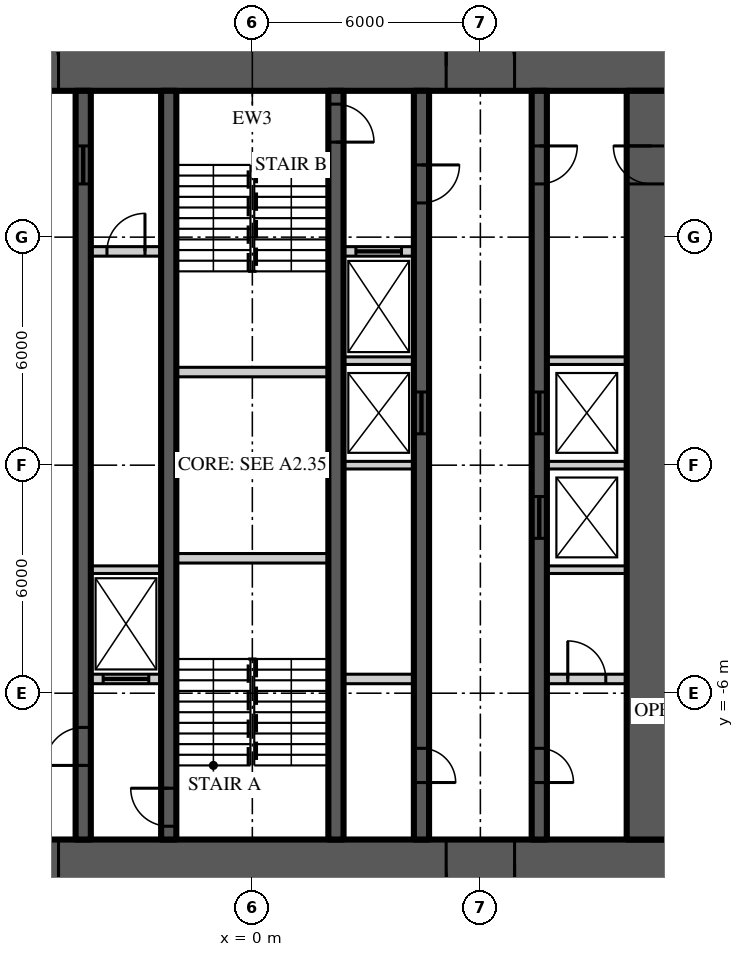
"""IFC4 building model, lengths in metres.
Left out: names, types, materials, properties, quantities, classifications, styles, units other than length and angle.
Written with IfcOpenShell. Run it as: python <this file> out.ifc"""

import sys

from ifc_helpers import new_model, si_unit, direction, frame, frame_2d, origin, place, context, subcontext, project, spatial, rectangle, extrude, element, fill, save


model = new_model("IFC4")
c1 = context("Model", 3, precision=1e-05, world=origin(), true_north=direction((0.0, 1.0)))
c2 = subcontext(c1, "Body", "Model", "MODEL_VIEW")
j1 = project(units=[si_unit("LENGTHUNIT", "METRE"), si_unit("PLANEANGLEUNIT", "RADIAN")], contexts=[c1])
p1 = place(None, origin())
s1 = spatial("IfcSite", under=j1, at=p1, CompositionType="ELEMENT")
p2 = place(p1, origin())
s2 = spatial("IfcBuilding", under=s1, at=p2, CompositionType="ELEMENT")
p3 = place(p2, frame((0.0, 0.0, 267.3)))
s3 = spatial("IfcBuildingStorey", under=s2, at=p3, CompositionType="ELEMENT", Elevation=267.3)
p4 = place(p3, frame((-11.15, 10.5, 0.0), z_axis=(0.0, 0.0, 1.0), x_axis=(1.0, 0.0, 0.0)))
e1 = element("IfcWall", 1, at=p4, inside=s3, PredefinedType="SHEAR", context=c2, shape_type="SweptSolid", body=[
    extrude(rectangle(XDim=22.3, YDim=1.3, at=frame_2d((11.15, 0.0))), origin(), (0.0, 0.0, 1.0), 3.9),
])
p5 = place(p4, frame((4.25, 0.0, 0.0)))
e2 = element("IfcOpeningElement", 2, at=p5, cuts=e1, PredefinedType="OPENING", context=c2, shape_type="SweptSolid", body=[
    extrude(rectangle(XDim=1.8, YDim=2.2, at=frame_2d((0.9, 1.1))), frame((0.0, 0.66, 0.0), z_axis=(0.0, -1.0, 0.0), x_axis=(1.0, 0.0, 0.0)), (0.0, 0.0, 1.0), 1.32),
])
p6 = place(p4, frame((16.25, 0.0, 0.0)))
e3 = element("IfcOpeningElement", 3, at=p6, cuts=e1, PredefinedType="OPENING", context=c2, shape_type="SweptSolid", body=[
    extrude(rectangle(XDim=1.8, YDim=2.2, at=frame_2d((0.9, 1.1))), frame((0.0, 0.66, 0.0), z_axis=(0.0, -1.0, 0.0), x_axis=(1.0, 0.0, 0.0)), (0.0, 0.0, 1.0), 1.32),
])
p7 = place(p3, frame((11.15, -10.5, 0.0), z_axis=(0.0, 0.0, 1.0), x_axis=(-1.0, 0.0, 0.0)))
e4 = element("IfcWall", 4, at=p7, inside=s3, PredefinedType="SHEAR", context=c2, shape_type="SweptSolid", body=[
    extrude(rectangle(XDim=22.3, YDim=1.3, at=frame_2d((11.15, 0.0))), origin(), (0.0, 0.0, 1.0), 3.9),
])
p8 = place(p7, frame((16.25, 0.0, 0.0)))
e5 = element("IfcOpeningElement", 5, at=p8, cuts=e4, PredefinedType="OPENING", context=c2, shape_type="SweptSolid", body=[
    extrude(rectangle(XDim=1.8, YDim=2.2, at=frame_2d((0.9, 1.1))), frame((0.0, 0.66, 0.0), z_axis=(0.0, -1.0, 0.0), x_axis=(1.0, 0.0, 0.0)), (0.0, 0.0, 1.0), 1.32),
])
p9 = place(p7, frame((4.25, 0.0, 0.0)))
e6 = element("IfcOpeningElement", 6, at=p9, cuts=e4, PredefinedType="OPENING", context=c2, shape_type="SweptSolid", body=[
    extrude(rectangle(XDim=1.8, YDim=2.2, at=frame_2d((0.9, 1.1))), frame((0.0, 0.66, 0.0), z_axis=(0.0, -1.0, 0.0), x_axis=(1.0, 0.0, 0.0)), (0.0, 0.0, 1.0), 1.32),
])
p10 = place(p3, frame((10.5, -9.85, 0.0), z_axis=(0.0, 0.0, 1.0), x_axis=(0.0, 1.0, 0.0)))
e7 = element("IfcWall", 7, at=p10, inside=s3, PredefinedType="SHEAR", context=c2, shape_type="SweptSolid", body=[
    extrude(rectangle(XDim=19.7, YDim=1.3, at=frame_2d((9.85, 0.0))), origin(), (0.0, 0.0, 1.0), 3.9),
])
p11 = place(p10, frame((17.25, 0.0, 0.0)))
e8 = element("IfcOpeningElement", 8, at=p11, cuts=e7, PredefinedType="OPENING", context=c2, shape_type="SweptSolid", body=[
    extrude(rectangle(XDim=1.0, YDim=2.2, at=frame_2d((0.5, 1.1))), frame((0.0, 0.66, 0.0), z_axis=(0.0, -1.0, 0.0), x_axis=(1.0, 0.0, 0.0)), (0.0, 0.0, 1.0), 1.32),
])
p12 = place(p3, frame((7.55, 9.85, 0.0), z_axis=(0.0, 0.0, 1.0), x_axis=(0.0, -1.0, 0.0)))
e9 = element("IfcWall", 9, at=p12, inside=s3, PredefinedType="SHEAR", context=c2, shape_type="SweptSolid", body=[
    extrude(rectangle(XDim=19.7, YDim=0.4, at=frame_2d((9.85, 0.0))), origin(), (0.0, 0.0, 1.0), 3.9),
])
p13 = place(p12, frame((1.45, 0.0, 0.0)))
e10 = element("IfcOpeningElement", 10, at=p13, cuts=e9, PredefinedType="OPENING", context=c2, shape_type="SweptSolid", body=[
    extrude(rectangle(XDim=1.0, YDim=2.2, at=frame_2d((0.5, 1.1))), frame((0.0, 0.21, 0.0), z_axis=(0.0, -1.0, 0.0), x_axis=(1.0, 0.0, 0.0)), (0.0, 0.0, 1.0), 0.42),
])
p14 = place(p12, frame((17.3, 0.0, 0.0)))
e11 = element("IfcOpeningElement", 11, at=p14, cuts=e9, PredefinedType="OPENING", context=c2, shape_type="SweptSolid", body=[
    extrude(rectangle(XDim=0.9, YDim=2.1, at=frame_2d((0.45, 1.05))), frame((0.0, 0.21, 0.0), z_axis=(0.0, -1.0, 0.0), x_axis=(1.0, 0.0, 0.0)), (0.0, 0.0, 1.0), 0.42),
])
p15 = place(p12, frame((7.925, 0.0, 0.0)))
e12 = element("IfcOpeningElement", 12, at=p15, cuts=e9, PredefinedType="OPENING", context=c2, shape_type="SweptSolid", body=[
    extrude(rectangle(XDim=1.1, YDim=2.2, at=frame_2d((0.55, 1.1))), frame((0.0, 0.21, 0.0), z_axis=(0.0, -1.0, 0.0), x_axis=(1.0, 0.0, 0.0)), (0.0, 0.0, 1.0), 0.42),
])
p16 = place(p12, frame((10.675, 0.0, 0.0)))
e13 = element("IfcOpeningElement", 13, at=p16, cuts=e9, PredefinedType="OPENING", context=c2, shape_type="SweptSolid", body=[
    extrude(rectangle(XDim=1.1, YDim=2.2, at=frame_2d((0.55, 1.1))), frame((0.0, 0.21, 0.0), z_axis=(0.0, -1.0, 0.0), x_axis=(1.0, 0.0, 0.0)), (0.0, 0.0, 1.0), 0.42),
])
p17 = place(p3, frame((-4.45, -9.85, 0.0), z_axis=(0.0, 0.0, 1.0), x_axis=(0.0, 1.0, 0.0)))
e14 = element("IfcWall", 14, at=p17, inside=s3, PredefinedType="SHEAR", context=c2, shape_type="SweptSolid", body=[
    extrude(rectangle(XDim=19.7, YDim=0.4, at=frame_2d((9.85, 0.0))), origin(), (0.0, 0.0, 1.0), 3.9),
])
p18 = place(p17, frame((1.95, 0.0, 0.0)))
e15 = element("IfcOpeningElement", 15, at=p18, cuts=e14, PredefinedType="OPENING", context=c2, shape_type="SweptSolid", body=[
    extrude(rectangle(XDim=1.0, YDim=2.2, at=frame_2d((0.5, 1.1))), frame((0.0, 0.21, 0.0), z_axis=(0.0, -1.0, 0.0), x_axis=(1.0, 0.0, 0.0)), (0.0, 0.0, 1.0), 0.42),
])
p19 = place(p17, frame((17.25, 0.0, 0.0)))
e16 = element("IfcOpeningElement", 16, at=p19, cuts=e14, PredefinedType="OPENING", context=c2, shape_type="SweptSolid", body=[
    extrude(rectangle(XDim=1.0, YDim=2.1, at=frame_2d((0.5, 1.05))), frame((0.0, 0.21, 0.0), z_axis=(0.0, -1.0, 0.0), x_axis=(1.0, 0.0, 0.0)), (0.0, 0.0, 1.0), 0.42),
])
p20 = place(p3, frame((4.45, 9.85, 0.0), z_axis=(0.0, 0.0, 1.0), x_axis=(0.0, -1.0, 0.0)))
e17 = element("IfcWall", 17, at=p20, inside=s3, PredefinedType="SHEAR", context=c2, shape_type="SweptSolid", body=[
    extrude(rectangle(XDim=19.7, YDim=0.4, at=frame_2d((9.85, 0.0))), origin(), (0.0, 0.0, 1.0), 3.9),
])
p21 = place(p20, frame((1.95, 0.0, 0.0)))
e18 = element("IfcOpeningElement", 18, at=p21, cuts=e17, PredefinedType="OPENING", context=c2, shape_type="SweptSolid", body=[
    extrude(rectangle(XDim=1.0, YDim=2.2, at=frame_2d((0.5, 1.1))), frame((0.0, 0.21, 0.0), z_axis=(0.0, -1.0, 0.0), x_axis=(1.0, 0.0, 0.0)), (0.0, 0.0, 1.0), 0.42),
])
p22 = place(p20, frame((17.3, 0.0, 0.0)))
e19 = element("IfcOpeningElement", 19, at=p22, cuts=e17, PredefinedType="OPENING", context=c2, shape_type="SweptSolid", body=[
    extrude(rectangle(XDim=0.9, YDim=2.1, at=frame_2d((0.45, 1.05))), frame((0.0, 0.21, 0.0), z_axis=(0.0, -1.0, 0.0), x_axis=(1.0, 0.0, 0.0)), (0.0, 0.0, 1.0), 0.42),
])
p23 = place(p20, frame((7.925, 0.0, 0.0)))
e20 = element("IfcOpeningElement", 20, at=p23, cuts=e17, PredefinedType="OPENING", context=c2, shape_type="SweptSolid", body=[
    extrude(rectangle(XDim=1.1, YDim=2.2, at=frame_2d((0.55, 1.1))), frame((0.0, 0.21, 0.0), z_axis=(0.0, -1.0, 0.0), x_axis=(1.0, 0.0, 0.0)), (0.0, 0.0, 1.0), 0.42),
])
p24 = place(p3, frame((-2.2, -9.85, 0.0), z_axis=(0.0, 0.0, 1.0), x_axis=(0.0, 1.0, 0.0)))
e21 = element("IfcWall", 21, at=p24, inside=s3, PredefinedType="SHEAR", context=c2, shape_type="SweptSolid", body=[
    extrude(rectangle(XDim=19.7, YDim=0.4, at=frame_2d((9.85, 0.0))), origin(), (0.0, 0.0, 1.0), 3.9),
])
p25 = place(p24, frame((0.35, 0.0, 0.0)))
e22 = element("IfcOpeningElement", 22, at=p25, cuts=e21, PredefinedType="OPENING", context=c2, shape_type="SweptSolid", body=[
    extrude(rectangle(XDim=1.0, YDim=2.2, at=frame_2d((0.5, 1.1))), frame((0.0, 0.21, 0.0), z_axis=(0.0, -1.0, 0.0), x_axis=(1.0, 0.0, 0.0)), (0.0, 0.0, 1.0), 0.42),
])
p26 = place(p3, frame((2.2, 9.85, 0.0), z_axis=(0.0, 0.0, 1.0), x_axis=(0.0, -1.0, 0.0)))
e23 = element("IfcWall", 23, at=p26, inside=s3, PredefinedType="SHEAR", context=c2, shape_type="SweptSolid", body=[
    extrude(rectangle(XDim=19.7, YDim=0.4, at=frame_2d((9.85, 0.0))), origin(), (0.0, 0.0, 1.0), 3.9),
])
p27 = place(p26, frame((0.35, 0.0, 0.0)))
e24 = element("IfcOpeningElement", 24, at=p27, cuts=e23, PredefinedType="OPENING", context=c2, shape_type="SweptSolid", body=[
    extrude(rectangle(XDim=1.0, YDim=2.2, at=frame_2d((0.5, 1.1))), frame((0.0, 0.21, 0.0), z_axis=(0.0, -1.0, 0.0), x_axis=(1.0, 0.0, 0.0)), (0.0, 0.0, 1.0), 0.42),
])
p28 = place(p3, frame((-4.25, 5.625, 0.0), z_axis=(0.0, 0.0, 1.0), x_axis=(1.0, 0.0, 0.0)))
e25 = element("IfcWall", 25, at=p28, inside=s3, PredefinedType="SOLIDWALL", context=c2, shape_type="SweptSolid", body=[
    extrude(rectangle(XDim=1.85, YDim=0.25, at=frame_2d((0.925, 0.0))), origin(), (0.0, 0.0, 1.0), 3.7),
])
p29 = place(p28, frame((0.425, 0.0, 0.0)))
e26 = element("IfcOpeningElement", 26, at=p29, cuts=e25, PredefinedType="OPENING", context=c2, shape_type="SweptSolid", body=[
    extrude(rectangle(XDim=1.0, YDim=2.2, at=frame_2d((0.5, 1.1))), frame((0.0, 0.135, 0.0), z_axis=(0.0, -1.0, 0.0), x_axis=(1.0, 0.0, 0.0)), (0.0, 0.0, 1.0), 0.27),
])
p30 = place(p3, frame((2.4, 5.625, 0.0), z_axis=(0.0, 0.0, 1.0), x_axis=(1.0, 0.0, 0.0)))
e27 = element("IfcWall", 27, at=p30, inside=s3, PredefinedType="SOLIDWALL", context=c2, shape_type="SweptSolid", body=[
    extrude(rectangle(XDim=1.85, YDim=0.25, at=frame_2d((0.925, 0.0))), origin(), (0.0, 0.0, 1.0), 3.7),
])
p31 = place(p30, frame((0.325, 0.0, 0.0)))
e28 = element("IfcOpeningElement", 28, at=p31, cuts=e27, PredefinedType="OPENING", context=c2, shape_type="SweptSolid", body=[
    extrude(rectangle(XDim=1.2, YDim=2.2, at=frame_2d((0.6, 1.1))), frame((0.0, 0.135, 0.0), z_axis=(0.0, -1.0, 0.0), x_axis=(1.0, 0.0, 0.0)), (0.0, 0.0, 1.0), 0.27),
])
p32 = place(p3, frame((-4.25, -5.625, 0.0), z_axis=(0.0, 0.0, 1.0), x_axis=(1.0, 0.0, 0.0)))
e29 = element("IfcWall", 29, at=p32, inside=s3, PredefinedType="SOLIDWALL", context=c2, shape_type="SweptSolid", body=[
    extrude(rectangle(XDim=1.85, YDim=0.25, at=frame_2d((0.925, 0.0))), origin(), (0.0, 0.0, 1.0), 3.7),
])
p33 = place(p32, frame((0.325, 0.0, 0.0)))
e30 = element("IfcOpeningElement", 30, at=p33, cuts=e29, PredefinedType="OPENING", context=c2, shape_type="SweptSolid", body=[
    extrude(rectangle(XDim=1.2, YDim=2.2, at=frame_2d((0.6, 1.1))), frame((0.0, 0.135, 0.0), z_axis=(0.0, -1.0, 0.0), x_axis=(1.0, 0.0, 0.0)), (0.0, 0.0, 1.0), 0.27),
])
p34 = place(p3, frame((2.4, -5.625, 0.0), z_axis=(0.0, 0.0, 1.0), x_axis=(1.0, 0.0, 0.0)))
e31 = element("IfcWall", 31, at=p34, inside=s3, PredefinedType="SOLIDWALL", context=c2, shape_type="SweptSolid", body=[
    extrude(rectangle(XDim=1.85, YDim=0.25, at=frame_2d((0.925, 0.0))), origin(), (0.0, 0.0, 1.0), 3.7),
])
p35 = place(p3, frame((7.75, -5.625, 0.0), z_axis=(0.0, 0.0, 1.0), x_axis=(1.0, 0.0, 0.0)))
e32 = element("IfcWall", 32, at=p35, inside=s3, PredefinedType="SOLIDWALL", context=c2, shape_type="SweptSolid", body=[
    extrude(rectangle(XDim=2.1, YDim=0.25, at=frame_2d((1.05, 0.0))), origin(), (0.0, 0.0, 1.0), 3.7),
])
p36 = place(p35, frame((0.55, 0.0, 0.0)))
e33 = element("IfcOpeningElement", 33, at=p36, cuts=e32, PredefinedType="OPENING", context=c2, shape_type="SweptSolid", body=[
    extrude(rectangle(XDim=1.0, YDim=2.2, at=frame_2d((0.5, 1.1))), frame((0.0, 0.135, 0.0), z_axis=(0.0, -1.0, 0.0), x_axis=(1.0, 0.0, 0.0)), (0.0, 0.0, 1.0), 0.27),
])
for number, where, z_axis, x_axis in (
    (34, (-2.0, -2.45, 0.0), (0.0, 0.0, 1.0), (1.0, 0.0, 0.0)),
    (35, (-2.0, 2.45, 0.0), (0.0, 0.0, 1.0), (1.0, 0.0, 0.0)),
):
    element("IfcWall", number, at=place(p3, frame(where, z_axis=z_axis, x_axis=x_axis)), inside=s3, PredefinedType="SOLIDWALL", context=c2, shape_type="SweptSolid", body=[
        extrude(rectangle(XDim=4.0, YDim=0.25, at=frame_2d((2.0, 0.0))), origin(), (0.0, 0.0, 1.0), 3.7),
    ])
p37 = place(p3, frame((-4.25, -2.75, 0.0), z_axis=(0.0, 0.0, 1.0), x_axis=(1.0, 0.0, 0.0)))
e36 = element("IfcWall", 36, at=p37, inside=s3, PredefinedType="SOLIDWALL", context=c2, shape_type="SweptSolid", body=[
    extrude(rectangle(XDim=1.85, YDim=0.2, at=frame_2d((0.925, 0.0))), origin(), (0.0, 0.0, 1.0), 3.7),
])
p38 = place(p3, frame((7.75, -2.75, 0.0), z_axis=(0.0, 0.0, 1.0), x_axis=(1.0, 0.0, 0.0)))
e37 = element("IfcWall", 37, at=p38, inside=s3, PredefinedType="SOLIDWALL", context=c2, shape_type="SweptSolid", body=[
    extrude(rectangle(XDim=2.1, YDim=0.2, at=frame_2d((1.05, 0.0))), origin(), (0.0, 0.0, 1.0), 3.7),
])
p39 = place(p3, frame((2.4, 0.0, 0.0), z_axis=(0.0, 0.0, 1.0), x_axis=(1.0, 0.0, 0.0)))
e38 = element("IfcWall", 38, at=p39, inside=s3, PredefinedType="SOLIDWALL", context=c2, shape_type="SweptSolid", body=[
    extrude(rectangle(XDim=1.85, YDim=0.2, at=frame_2d((0.925, 0.0))), origin(), (0.0, 0.0, 1.0), 3.7),
])
p40 = place(p3, frame((7.75, 0.0, 0.0), z_axis=(0.0, 0.0, 1.0), x_axis=(1.0, 0.0, 0.0)))
e39 = element("IfcWall", 39, at=p40, inside=s3, PredefinedType="SOLIDWALL", context=c2, shape_type="SweptSolid", body=[
    extrude(rectangle(XDim=2.1, YDim=0.2, at=frame_2d((1.05, 0.0))), origin(), (0.0, 0.0, 1.0), 3.7),
])
p41 = place(p3, frame((2.4, 2.75, 0.0), z_axis=(0.0, 0.0, 1.0), x_axis=(1.0, 0.0, 0.0)))
e40 = element("IfcWall", 40, at=p41, inside=s3, PredefinedType="SOLIDWALL", context=c2, shape_type="SweptSolid", body=[
    extrude(rectangle(XDim=1.85, YDim=0.2, at=frame_2d((0.925, 0.0))), origin(), (0.0, 0.0, 1.0), 3.7),
])
p42 = place(p3, frame((7.75, 2.75, 0.0), z_axis=(0.0, 0.0, 1.0), x_axis=(1.0, 0.0, 0.0)))
e41 = element("IfcWall", 41, at=p42, inside=s3, PredefinedType="SOLIDWALL", context=c2, shape_type="SweptSolid", body=[
    extrude(rectangle(XDim=2.1, YDim=0.2, at=frame_2d((1.05, 0.0))), origin(), (0.0, 0.0, 1.0), 3.7),
])
p43 = place(p5, origin())
e42 = element("IfcDoor", 42, at=p43, inside=s3, OperationType="DOUBLE_DOOR_DOUBLE_SWING", PredefinedType="DOOR", context=c2, shape_type="SweptSolid", body=[
    extrude(rectangle(XDim=1.8, YDim=2.2, at=frame_2d((0.9, 1.1))), frame((0.0, 0.025, 0.0), z_axis=(0.0, -1.0, 0.0), x_axis=(1.0, 0.0, 0.0)), (0.0, 0.0, 1.0), 0.05),
])
fill(e2, e42)
p44 = place(p8, origin())
e43 = element("IfcDoor", 43, at=p44, inside=s3, OperationType="DOUBLE_DOOR_DOUBLE_SWING", PredefinedType="DOOR", context=c2, shape_type="SweptSolid", body=[
    extrude(rectangle(XDim=1.8, YDim=2.2, at=frame_2d((0.9, 1.1))), frame((0.0, 0.025, 0.0), z_axis=(0.0, -1.0, 0.0), x_axis=(1.0, 0.0, 0.0)), (0.0, 0.0, 1.0), 0.05),
])
fill(e5, e43)
p45 = place(p6, origin())
e44 = element("IfcDoor", 44, at=p45, inside=s3, OperationType="DOUBLE_DOOR_DOUBLE_SWING", PredefinedType="DOOR", context=c2, shape_type="SweptSolid", body=[
    extrude(rectangle(XDim=1.8, YDim=2.2, at=frame_2d((0.9, 1.1))), frame((0.0, 0.025, 0.0), z_axis=(0.0, -1.0, 0.0), x_axis=(1.0, 0.0, 0.0)), (0.0, 0.0, 1.0), 0.05),
])
fill(e3, e44)
p46 = place(p9, origin())
e45 = element("IfcDoor", 45, at=p46, inside=s3, OperationType="DOUBLE_DOOR_DOUBLE_SWING", PredefinedType="DOOR", context=c2, shape_type="SweptSolid", body=[
    extrude(rectangle(XDim=1.8, YDim=2.2, at=frame_2d((0.9, 1.1))), frame((0.0, 0.025, 0.0), z_axis=(0.0, -1.0, 0.0), x_axis=(1.0, 0.0, 0.0)), (0.0, 0.0, 1.0), 0.05),
])
fill(e6, e45)
p47 = place(p13, origin())
e46 = element("IfcDoor", 46, at=p47, inside=s3, OperationType="SINGLE_SWING_LEFT", PredefinedType="DOOR", context=c2, shape_type="SweptSolid", body=[
    extrude(rectangle(XDim=1.0, YDim=2.2, at=frame_2d((0.5, 1.1))), frame((0.0, 0.025, 0.0), z_axis=(0.0, -1.0, 0.0), x_axis=(1.0, 0.0, 0.0)), (0.0, 0.0, 1.0), 0.05),
])
fill(e10, e46)
p48 = place(p11, origin())
e47 = element("IfcDoor", 47, at=p48, inside=s3, OperationType="SINGLE_SWING_RIGHT", PredefinedType="DOOR", context=c2, shape_type="SweptSolid", body=[
    extrude(rectangle(XDim=1.0, YDim=2.2, at=frame_2d((0.5, 1.1))), frame((0.0, 0.025, 0.0), z_axis=(0.0, -1.0, 0.0), x_axis=(1.0, 0.0, 0.0)), (0.0, 0.0, 1.0), 0.05),
])
fill(e8, e47)
p49 = place(p18, origin())
e48 = element("IfcDoor", 48, at=p49, inside=s3, OperationType="SINGLE_SWING_LEFT", PredefinedType="DOOR", context=c2, shape_type="SweptSolid", body=[
    extrude(rectangle(XDim=1.0, YDim=2.2, at=frame_2d((0.5, 1.1))), frame((0.0, 0.025, 0.0), z_axis=(0.0, -1.0, 0.0), x_axis=(1.0, 0.0, 0.0)), (0.0, 0.0, 1.0), 0.05),
])
fill(e15, e48)
p50 = place(p25, origin())
e49 = element("IfcDoor", 49, at=p50, inside=s3, OperationType="SINGLE_SWING_RIGHT", PredefinedType="DOOR", context=c2, shape_type="SweptSolid", body=[
    extrude(rectangle(XDim=1.0, YDim=2.2, at=frame_2d((0.5, 1.1))), frame((0.0, 0.025, 0.0), z_axis=(0.0, -1.0, 0.0), x_axis=(1.0, 0.0, 0.0)), (0.0, 0.0, 1.0), 0.05),
])
fill(e22, e49)
p51 = place(p21, origin())
e50 = element("IfcDoor", 50, at=p51, inside=s3, OperationType="SINGLE_SWING_LEFT", PredefinedType="DOOR", context=c2, shape_type="SweptSolid", body=[
    extrude(rectangle(XDim=1.0, YDim=2.2, at=frame_2d((0.5, 1.1))), frame((0.0, 0.025, 0.0), z_axis=(0.0, -1.0, 0.0), x_axis=(1.0, 0.0, 0.0)), (0.0, 0.0, 1.0), 0.05),
])
fill(e18, e50)
p52 = place(p27, origin())
e51 = element("IfcDoor", 51, at=p52, inside=s3, OperationType="SINGLE_SWING_RIGHT", PredefinedType="DOOR", context=c2, shape_type="SweptSolid", body=[
    extrude(rectangle(XDim=1.0, YDim=2.2, at=frame_2d((0.5, 1.1))), frame((0.0, 0.025, 0.0), z_axis=(0.0, -1.0, 0.0), x_axis=(1.0, 0.0, 0.0)), (0.0, 0.0, 1.0), 0.05),
])
fill(e24, e51)
p53 = place(p19, origin())
e52 = element("IfcDoor", 52, at=p53, inside=s3, OperationType="SLIDING_TO_LEFT", PredefinedType="DOOR", context=c2, shape_type="SweptSolid", body=[
    extrude(rectangle(XDim=1.0, YDim=2.1, at=frame_2d((0.5, 1.05))), frame((0.0, 0.025, 0.0), z_axis=(0.0, -1.0, 0.0), x_axis=(1.0, 0.0, 0.0)), (0.0, 0.0, 1.0), 0.05),
])
fill(e16, e52)
p54 = place(p14, origin())
e53 = element("IfcDoor", 53, at=p54, inside=s3, OperationType="SINGLE_SWING_RIGHT", PredefinedType="DOOR", context=c2, shape_type="SweptSolid", body=[
    extrude(rectangle(XDim=0.9, YDim=2.1, at=frame_2d((0.45, 1.05))), frame((0.0, 0.025, 0.0), z_axis=(0.0, -1.0, 0.0), x_axis=(1.0, 0.0, 0.0)), (0.0, 0.0, 1.0), 0.05),
])
fill(e11, e53)
p55 = place(p22, origin())
e54 = element("IfcDoor", 54, at=p55, inside=s3, OperationType="SINGLE_SWING_RIGHT", PredefinedType="DOOR", context=c2, shape_type="SweptSolid", body=[
    extrude(rectangle(XDim=0.9, YDim=2.1, at=frame_2d((0.45, 1.05))), frame((0.0, 0.025, 0.0), z_axis=(0.0, -1.0, 0.0), x_axis=(1.0, 0.0, 0.0)), (0.0, 0.0, 1.0), 0.05),
])
fill(e19, e54)
p56 = place(p15, origin())
e55 = element("IfcDoor", 55, at=p56, inside=s3, OperationType="SLIDING_TO_LEFT", PredefinedType="DOOR", context=c2, shape_type="SweptSolid", body=[
    extrude(rectangle(XDim=1.1, YDim=2.2, at=frame_2d((0.55, 1.1))), frame((0.0, 0.025, 0.0), z_axis=(0.0, -1.0, 0.0), x_axis=(1.0, 0.0, 0.0)), (0.0, 0.0, 1.0), 0.05),
])
fill(e12, e55)
p57 = place(p16, origin())
e56 = element("IfcDoor", 56, at=p57, inside=s3, OperationType="SLIDING_TO_LEFT", PredefinedType="DOOR", context=c2, shape_type="SweptSolid", body=[
    extrude(rectangle(XDim=1.1, YDim=2.2, at=frame_2d((0.55, 1.1))), frame((0.0, 0.025, 0.0), z_axis=(0.0, -1.0, 0.0), x_axis=(1.0, 0.0, 0.0)), (0.0, 0.0, 1.0), 0.05),
])
fill(e13, e56)
p58 = place(p23, origin())
e57 = element("IfcDoor", 57, at=p58, inside=s3, OperationType="SLIDING_TO_LEFT", PredefinedType="DOOR", context=c2, shape_type="SweptSolid", body=[
    extrude(rectangle(XDim=1.1, YDim=2.2, at=frame_2d((0.55, 1.1))), frame((0.0, 0.025, 0.0), z_axis=(0.0, -1.0, 0.0), x_axis=(1.0, 0.0, 0.0)), (0.0, 0.0, 1.0), 0.05),
])
fill(e20, e57)
p59 = place(p33, origin())
e58 = element("IfcDoor", 58, at=p59, inside=s3, OperationType="SLIDING_TO_LEFT", PredefinedType="DOOR", context=c2, shape_type="SweptSolid", body=[
    extrude(rectangle(XDim=1.2, YDim=2.2, at=frame_2d((0.6, 1.1))), frame((0.0, 0.025, 0.0), z_axis=(0.0, -1.0, 0.0), x_axis=(1.0, 0.0, 0.0)), (0.0, 0.0, 1.0), 0.05),
])
fill(e30, e58)
p60 = place(p31, origin())
e59 = element("IfcDoor", 59, at=p60, inside=s3, OperationType="SLIDING_TO_LEFT", PredefinedType="DOOR", context=c2, shape_type="SweptSolid", body=[
    extrude(rectangle(XDim=1.2, YDim=2.2, at=frame_2d((0.6, 1.1))), frame((0.0, 0.025, 0.0), z_axis=(0.0, -1.0, 0.0), x_axis=(1.0, 0.0, 0.0)), (0.0, 0.0, 1.0), 0.05),
])
fill(e28, e59)
p61 = place(p29, origin())
e60 = element("IfcDoor", 60, at=p61, inside=s3, OperationType="SINGLE_SWING_RIGHT", PredefinedType="DOOR", context=c2, shape_type="SweptSolid", body=[
    extrude(rectangle(XDim=1.0, YDim=2.2, at=frame_2d((0.5, 1.1))), frame((0.0, 0.025, 0.0), z_axis=(0.0, -1.0, 0.0), x_axis=(1.0, 0.0, 0.0)), (0.0, 0.0, 1.0), 0.05),
])
fill(e26, e60)
p62 = place(p36, origin())
e61 = element("IfcDoor", 61, at=p62, inside=s3, OperationType="SINGLE_SWING_LEFT", PredefinedType="DOOR", context=c2, shape_type="SweptSolid", body=[
    extrude(rectangle(XDim=1.0, YDim=2.2, at=frame_2d((0.5, 1.1))), frame((0.0, 0.025, 0.0), z_axis=(0.0, -1.0, 0.0), x_axis=(1.0, 0.0, 0.0)), (0.0, 0.0, 1.0), 0.05),
])
fill(e33, e61)
save(model, sys.argv[1])
